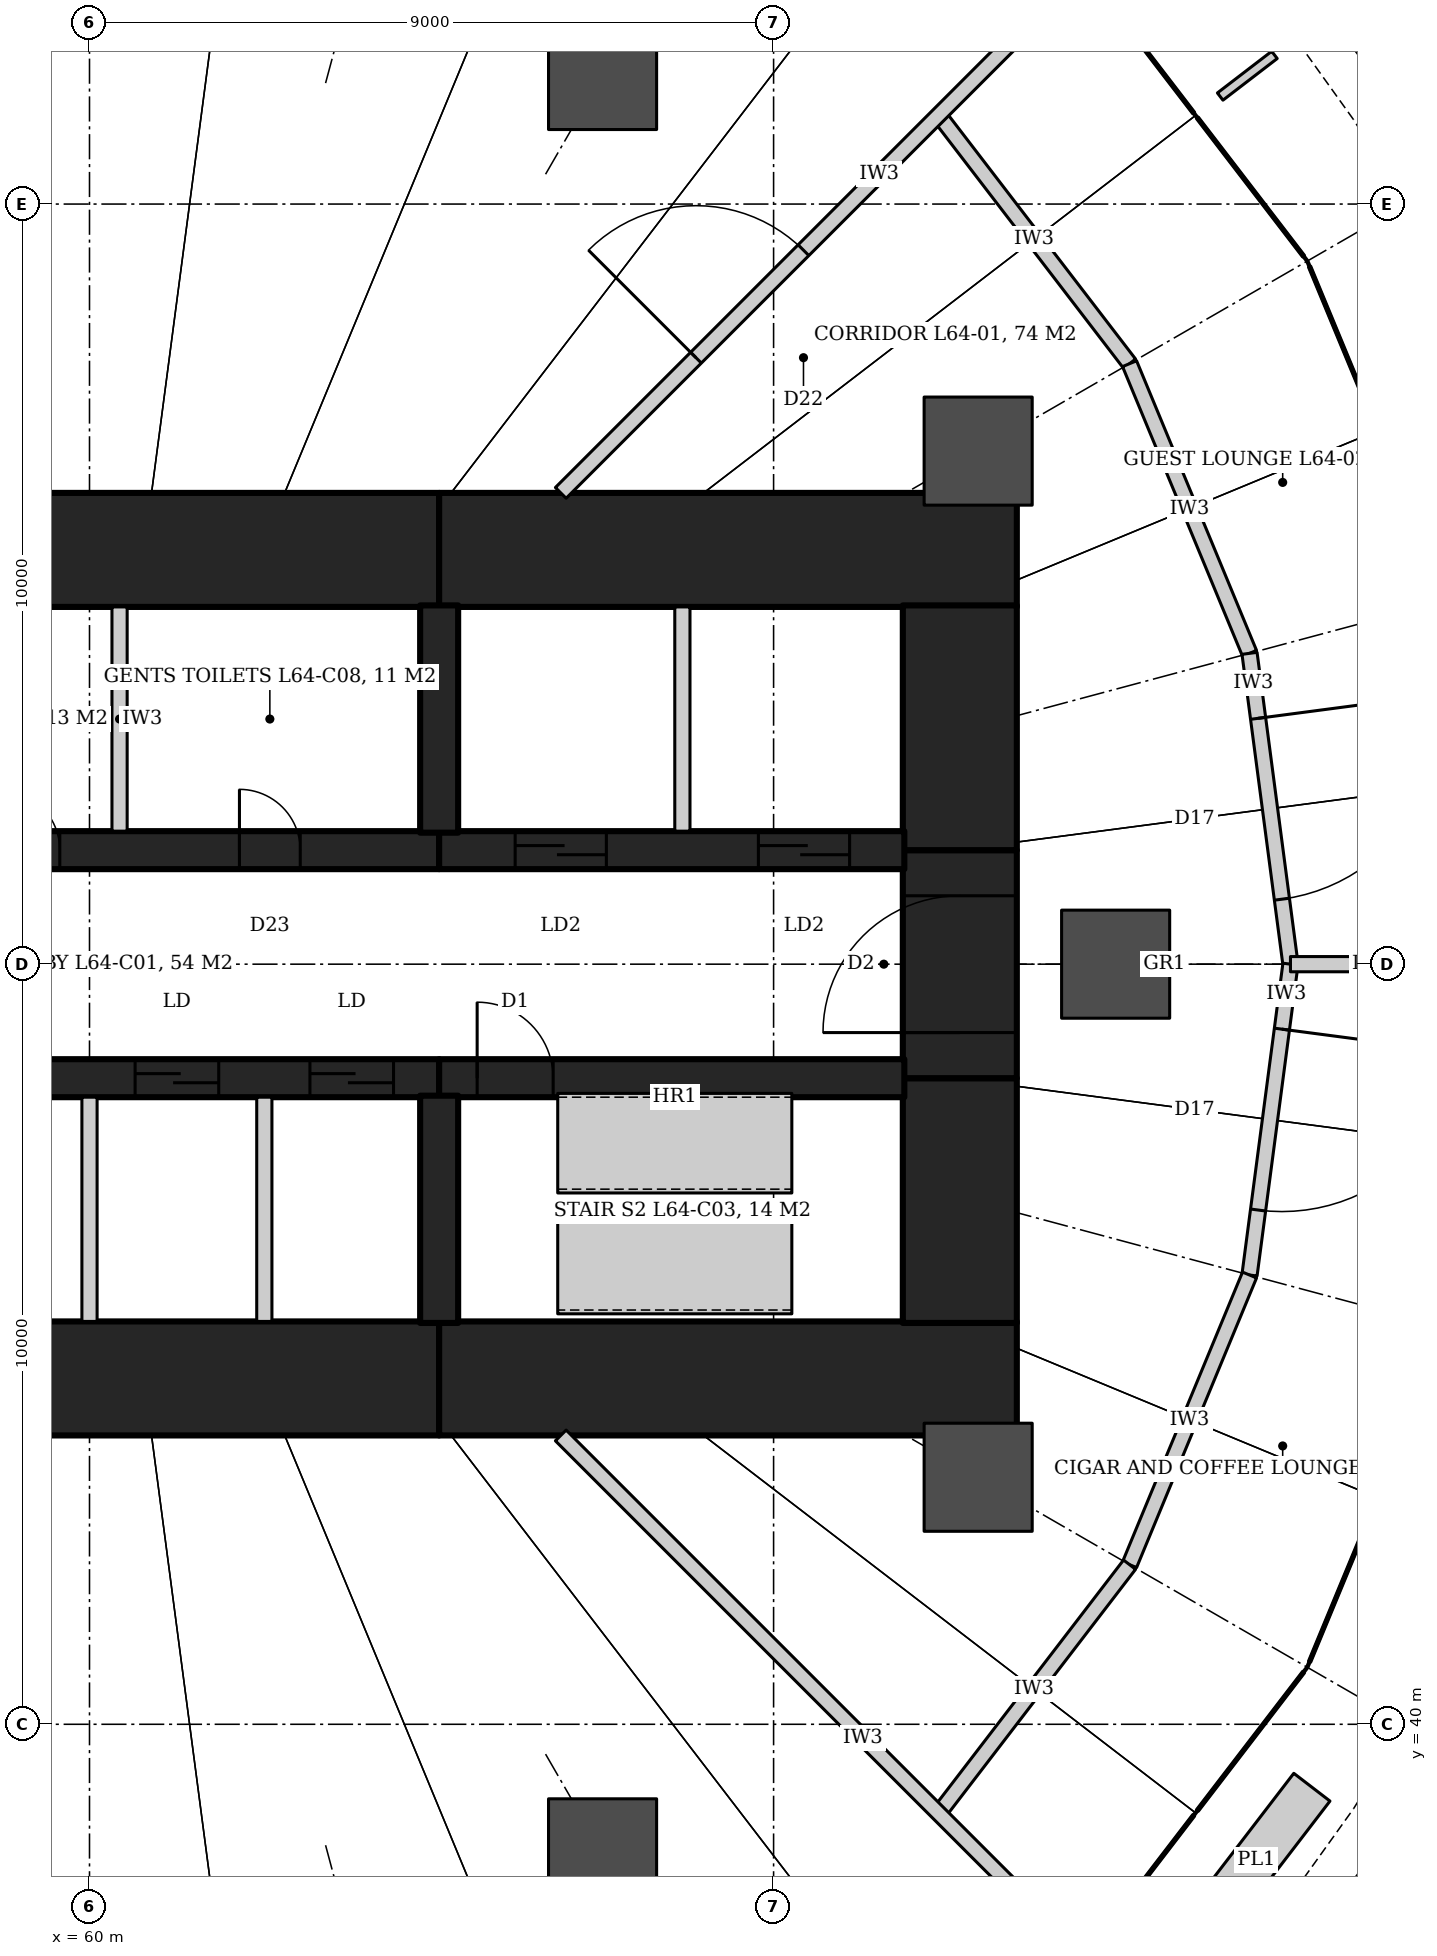
"""IFC4 building model, lengths in metres.
Left out: names, types, materials, properties, quantities, classifications, styles, units other than length and angle.
Written with IfcOpenShell. Run it as: python <this file> out.ifc"""

import sys

from ifc_helpers import new_model, si_unit, direction, frame, frame_2d, origin, origin_2d, place, context, subcontext, project, spatial, rectangle, hollow_circle, extrude, element, fill, save


model = new_model("IFC4")
c1 = context("Model", 3, precision=1e-05, world=origin(), true_north=direction((0.0, 1.0)))
c2 = subcontext(c1, "Body", "Model", "MODEL_VIEW")
j1 = project(units=[si_unit("LENGTHUNIT", "METRE"), si_unit("PLANEANGLEUNIT", "RADIAN")], contexts=[c1])
p1 = place(None, origin())
s1 = spatial("IfcSite", under=j1, at=p1, CompositionType="ELEMENT")
p2 = place(p1, origin())
s2 = spatial("IfcBuilding", under=s1, at=p2, CompositionType="ELEMENT")
p3 = place(p2, frame((0.0, 0.0, 278.0)))
s3 = spatial("IfcBuildingStorey", under=s2, at=p3, CompositionType="ELEMENT", Elevation=278.0)
p4 = place(p3, frame((55.4, 55.45, 0.0), z_axis=(0.0, 0.0, 1.0), x_axis=(1.0, 0.0, 0.0)))
e1 = element("IfcWall", 1, at=p4, inside=s3, PredefinedType="SHEAR", context=c2, shape_type="SweptSolid", body=[
    extrude(rectangle(XDim=9.2, YDim=1.5, at=frame_2d((4.6, 0.0))), origin(), (0.0, 0.0, 1.0), 4.2),
])
p5 = place(p3, frame((64.6, 55.45, 0.0), z_axis=(0.0, 0.0, 1.0), x_axis=(1.0, 0.0, 0.0)))
e2 = element("IfcWall", 2, at=p5, inside=s3, PredefinedType="SHEAR", context=c2, shape_type="SweptSolid", body=[
    extrude(rectangle(XDim=7.6, YDim=1.5, at=frame_2d((3.8, 0.0))), origin(), (0.0, 0.0, 1.0), 4.2),
])
p6 = place(p3, frame((55.4, 44.55, 0.0), z_axis=(0.0, 0.0, 1.0), x_axis=(1.0, 0.0, 0.0)))
e3 = element("IfcWall", 3, at=p6, inside=s3, PredefinedType="SHEAR", context=c2, shape_type="SweptSolid", body=[
    extrude(rectangle(XDim=9.2, YDim=1.5, at=frame_2d((4.6, 0.0))), origin(), (0.0, 0.0, 1.0), 4.2),
])
p7 = place(p3, frame((64.6, 44.55, 0.0), z_axis=(0.0, 0.0, 1.0), x_axis=(1.0, 0.0, 0.0)))
e4 = element("IfcWall", 4, at=p7, inside=s3, PredefinedType="SHEAR", context=c2, shape_type="SweptSolid", body=[
    extrude(rectangle(XDim=7.6, YDim=1.5, at=frame_2d((3.8, 0.0))), origin(), (0.0, 0.0, 1.0), 4.2),
])
p8 = place(p3, frame((71.45, 45.28, 0.0), z_axis=(0.0, 0.0, 1.0), x_axis=(0.0, 1.0, 0.0)))
e5 = element("IfcWall", 5, at=p8, inside=s3, PredefinedType="SHEAR", context=c2, shape_type="SweptSolid", body=[
    extrude(rectangle(XDim=3.22, YDim=1.5, at=frame_2d((1.61, 0.0))), origin(), (0.0, 0.0, 1.0), 4.2),
])
p9 = place(p3, frame((71.45, 48.5, 0.0), z_axis=(0.0, 0.0, 1.0), x_axis=(0.0, 1.0, 0.0)))
e6 = element("IfcWall", 6, at=p9, inside=s3, PredefinedType="SHEAR", context=c2, shape_type="SweptSolid", body=[
    extrude(rectangle(XDim=3.0, YDim=1.5, at=frame_2d((1.5, 0.0))), origin(), (0.0, 0.0, 1.0), 4.2),
])
p10 = place(p9, frame((0.6, 0.0, 0.0)))
e7 = element("IfcOpeningElement", 7, at=p10, cuts=e6, PredefinedType="OPENING", context=c2, shape_type="SweptSolid", body=[
    extrude(rectangle(XDim=1.8, YDim=2.1, at=frame_2d((0.9, 1.05))), frame((0.0, 0.76, 0.0), z_axis=(0.0, -1.0, 0.0), x_axis=(1.0, 0.0, 0.0)), (0.0, 0.0, 1.0), 1.52),
])
p11 = place(p3, frame((71.45, 51.5, 0.0), z_axis=(0.0, 0.0, 1.0), x_axis=(0.0, 1.0, 0.0)))
e8 = element("IfcWall", 8, at=p11, inside=s3, PredefinedType="SHEAR", context=c2, shape_type="SweptSolid", body=[
    extrude(rectangle(XDim=3.22, YDim=1.5, at=frame_2d((1.61, 0.0))), origin(), (0.0, 0.0, 1.0), 4.2),
])
p12 = place(p3, frame((55.4, 51.5, 0.0), z_axis=(0.0, 0.0, 1.0), x_axis=(1.0, 0.0, 0.0)))
e9 = element("IfcWall", 9, at=p12, inside=s3, PredefinedType="SHEAR", context=c2, shape_type="SweptSolid", body=[
    extrude(rectangle(XDim=9.2, YDim=0.5, at=frame_2d((4.6, 0.0))), origin(), (0.0, 0.0, 1.0), 4.2),
])
p13 = place(p12, frame((1.036, 0.0, 0.0)))
e10 = element("IfcOpeningElement", 10, at=p13, cuts=e9, PredefinedType="OPENING", context=c2, shape_type="SweptSolid", body=[
    extrude(rectangle(XDim=0.8, YDim=2.1, at=frame_2d((0.4, 1.05))), frame((0.0, 0.26, 0.0), z_axis=(0.0, -1.0, 0.0), x_axis=(1.0, 0.0, 0.0)), (0.0, 0.0, 1.0), 0.52),
])
p14 = place(p12, frame((3.409, 0.0, 0.0)))
e11 = element("IfcOpeningElement", 11, at=p14, cuts=e9, PredefinedType="OPENING", context=c2, shape_type="SweptSolid", body=[
    extrude(rectangle(XDim=0.8, YDim=2.1, at=frame_2d((0.4, 1.05))), frame((0.0, 0.26, 0.0), z_axis=(0.0, -1.0, 0.0), x_axis=(1.0, 0.0, 0.0)), (0.0, 0.0, 1.0), 0.52),
])
p15 = place(p12, frame((6.573, 0.0, 0.0)))
e12 = element("IfcOpeningElement", 12, at=p15, cuts=e9, PredefinedType="OPENING", context=c2, shape_type="SweptSolid", body=[
    extrude(rectangle(XDim=0.8, YDim=2.1, at=frame_2d((0.4, 1.05))), frame((0.0, 0.26, 0.0), z_axis=(0.0, -1.0, 0.0), x_axis=(1.0, 0.0, 0.0)), (0.0, 0.0, 1.0), 0.52),
])
p16 = place(p3, frame((64.6, 51.5, 0.0), z_axis=(0.0, 0.0, 1.0), x_axis=(1.0, 0.0, 0.0)))
e13 = element("IfcWall", 13, at=p16, inside=s3, PredefinedType="SHEAR", context=c2, shape_type="SweptSolid", body=[
    extrude(rectangle(XDim=6.12, YDim=0.5, at=frame_2d((3.06, 0.0))), origin(), (0.0, 0.0, 1.0), 4.2),
])
p17 = place(p16, frame((1.0, 0.0, 0.0)))
e14 = element("IfcOpeningElement", 14, at=p17, cuts=e13, PredefinedType="OPENING", context=c2, shape_type="SweptSolid", body=[
    extrude(rectangle(XDim=1.2, YDim=2.1, at=frame_2d((0.6, 1.05))), frame((0.0, 0.26, 0.0), z_axis=(0.0, -1.0, 0.0), x_axis=(1.0, 0.0, 0.0)), (0.0, 0.0, 1.0), 0.52),
])
p18 = place(p16, frame((4.2, 0.0, 0.0)))
e15 = element("IfcOpeningElement", 15, at=p18, cuts=e13, PredefinedType="OPENING", context=c2, shape_type="SweptSolid", body=[
    extrude(rectangle(XDim=1.2, YDim=2.1, at=frame_2d((0.6, 1.05))), frame((0.0, 0.26, 0.0), z_axis=(0.0, -1.0, 0.0), x_axis=(1.0, 0.0, 0.0)), (0.0, 0.0, 1.0), 0.52),
])
p19 = place(p3, frame((55.4, 48.5, 0.0), z_axis=(0.0, 0.0, 1.0), x_axis=(1.0, 0.0, 0.0)))
e16 = element("IfcWall", 16, at=p19, inside=s3, PredefinedType="SHEAR", context=c2, shape_type="SweptSolid", body=[
    extrude(rectangle(XDim=9.2, YDim=0.5, at=frame_2d((4.6, 0.0))), origin(), (0.0, 0.0, 1.0), 4.2),
])
p20 = place(p19, frame((0.6, 0.0, 0.0)))
e17 = element("IfcOpeningElement", 17, at=p20, cuts=e16, PredefinedType="OPENING", context=c2, shape_type="SweptSolid", body=[
    extrude(rectangle(XDim=1.1, YDim=2.1, at=frame_2d((0.55, 1.05))), frame((0.0, 0.26, 0.0), z_axis=(0.0, -1.0, 0.0), x_axis=(1.0, 0.0, 0.0)), (0.0, 0.0, 1.0), 0.52),
])
p21 = place(p19, frame((2.9, 0.0, 0.0)))
e18 = element("IfcOpeningElement", 18, at=p21, cuts=e16, PredefinedType="OPENING", context=c2, shape_type="SweptSolid", body=[
    extrude(rectangle(XDim=1.1, YDim=2.1, at=frame_2d((0.55, 1.05))), frame((0.0, 0.26, 0.0), z_axis=(0.0, -1.0, 0.0), x_axis=(1.0, 0.0, 0.0)), (0.0, 0.0, 1.0), 0.52),
])
p22 = place(p19, frame((5.2, 0.0, 0.0)))
e19 = element("IfcOpeningElement", 19, at=p22, cuts=e16, PredefinedType="OPENING", context=c2, shape_type="SweptSolid", body=[
    extrude(rectangle(XDim=1.1, YDim=2.1, at=frame_2d((0.55, 1.05))), frame((0.0, 0.26, 0.0), z_axis=(0.0, -1.0, 0.0), x_axis=(1.0, 0.0, 0.0)), (0.0, 0.0, 1.0), 0.52),
])
p23 = place(p19, frame((7.5, 0.0, 0.0)))
e20 = element("IfcOpeningElement", 20, at=p23, cuts=e16, PredefinedType="OPENING", context=c2, shape_type="SweptSolid", body=[
    extrude(rectangle(XDim=1.1, YDim=2.1, at=frame_2d((0.55, 1.05))), frame((0.0, 0.26, 0.0), z_axis=(0.0, -1.0, 0.0), x_axis=(1.0, 0.0, 0.0)), (0.0, 0.0, 1.0), 0.52),
])
p24 = place(p3, frame((64.6, 48.5, 0.0), z_axis=(0.0, 0.0, 1.0), x_axis=(1.0, 0.0, 0.0)))
e21 = element("IfcWall", 21, at=p24, inside=s3, PredefinedType="SHEAR", context=c2, shape_type="SweptSolid", body=[
    extrude(rectangle(XDim=6.12, YDim=0.5, at=frame_2d((3.06, 0.0))), origin(), (0.0, 0.0, 1.0), 4.2),
])
p25 = place(p24, frame((0.5, 0.0, 0.0)))
e22 = element("IfcOpeningElement", 22, at=p25, cuts=e21, PredefinedType="OPENING", context=c2, shape_type="SweptSolid", body=[
    extrude(rectangle(XDim=1.0, YDim=2.1, at=frame_2d((0.5, 1.05))), frame((0.0, 0.26, 0.0), z_axis=(0.0, -1.0, 0.0), x_axis=(1.0, 0.0, 0.0)), (0.0, 0.0, 1.0), 0.52),
])
for number, where, z_axis, x_axis in (
    (23, (64.6, 51.73, 0.0), (0.0, 0.0, 1.0), (0.0, 1.0, 0.0)),
    (24, (64.6, 48.27, 0.0), (0.0, 0.0, 1.0), (0.0, -1.0, 0.0)),
):
    element("IfcWall", number, at=place(p3, frame(where, z_axis=z_axis, x_axis=x_axis)), inside=s3, PredefinedType="SHEAR", context=c2, shape_type="SweptSolid", body=[
        extrude(rectangle(XDim=2.99, YDim=0.5, at=frame_2d((1.495, 0.0))), origin(), (0.0, 0.0, 1.0), 4.2),
    ])
for number, where, z_axis, x_axis in (
    (25, (73.5, 50.0, 0.0), (0.0, 0.0, 1.0), (1.0, 0.0, 0.0)),
    (26, (71.691, 56.75, 0.0), (0.0, 0.0, 1.0), (1.0, 0.0, 0.0)),
    (27, (66.75, 61.691, 0.0), (0.0, 0.0, 1.0), (1.0, 0.0, 0.0)),
    (28, (66.75, 38.309, 0.0), (0.0, 0.0, 1.0), (1.0, 0.0, 0.0)),
    (29, (71.691, 43.25, 0.0), (0.0, 0.0, 1.0), (1.0, 0.0, 0.0)),
):
    element("IfcColumn", number, at=place(p3, frame(where, z_axis=z_axis, x_axis=x_axis)), inside=s3, PredefinedType="COLUMN", context=c2, shape_type="SweptSolid", body=[
        extrude(hollow_circle(Radius=0.711, WallThickness=0.07, at=origin_2d()), origin(), (0.0, 0.0, 1.0), 4.2),
    ])
p26 = place(p3, frame((71.172, 61.172, 0.0), z_axis=(0.0, 0.0, 1.0), x_axis=(0.608714823874, -0.793389099494, 0.0)))
e30 = element("IfcWall", 30, at=p26, inside=s3, PredefinedType="PARTITIONING", context=c2, shape_type="SweptSolid", body=[
    extrude(rectangle(XDim=4.125, YDim=0.2, at=frame_2d((2.062, 0.0))), origin(), (0.0, 0.0, 1.0), 3.02),
])
p27 = place(p3, frame((73.683, 57.9, 0.0), z_axis=(0.0, 0.0, 1.0), x_axis=(0.382731667114, -0.923859551549, 0.0)))
e31 = element("IfcWall", 31, at=p27, inside=s3, PredefinedType="PARTITIONING", context=c2, shape_type="SweptSolid", body=[
    extrude(rectangle(XDim=4.125, YDim=0.2, at=frame_2d((2.062, 0.0))), origin(), (0.0, 0.0, 1.0), 3.02),
])
p28 = place(p3, frame((75.262, 54.089, 0.0), z_axis=(0.0, 0.0, 1.0), x_axis=(0.130515758099, -0.991446234996, 0.0)))
e32 = element("IfcWall", 32, at=p28, inside=s3, PredefinedType="PARTITIONING", context=c2, shape_type="SweptSolid", body=[
    extrude(rectangle(XDim=4.125, YDim=0.2, at=frame_2d((2.062, 0.0))), origin(), (0.0, 0.0, 1.0), 3.02),
])
p29 = place(p28, frame((0.862, 0.0, 0.0)))
e33 = element("IfcOpeningElement", 33, at=p29, cuts=e32, PredefinedType="OPENING", context=c2, shape_type="SweptSolid", body=[
    extrude(rectangle(XDim=2.4, YDim=2.4, at=frame_2d((1.2, 1.2))), frame((0.0, 0.11, 0.0), z_axis=(0.0, -1.0, 0.0), x_axis=(1.0, 0.0, 0.0)), (0.0, 0.0, 1.0), 0.22),
])
p30 = place(p3, frame((75.8, 50.0, 0.0), z_axis=(0.0, 0.0, 1.0), x_axis=(-0.130515758099, -0.991446234996, 0.0)))
e34 = element("IfcWall", 34, at=p30, inside=s3, PredefinedType="PARTITIONING", context=c2, shape_type="SweptSolid", body=[
    extrude(rectangle(XDim=4.125, YDim=0.2, at=frame_2d((2.062, 0.0))), origin(), (0.0, 0.0, 1.0), 3.02),
])
p31 = place(p30, frame((0.862, 0.0, 0.0)))
e35 = element("IfcOpeningElement", 35, at=p31, cuts=e34, PredefinedType="OPENING", context=c2, shape_type="SweptSolid", body=[
    extrude(rectangle(XDim=2.4, YDim=2.4, at=frame_2d((1.2, 1.2))), frame((0.0, 0.11, 0.0), z_axis=(0.0, -1.0, 0.0), x_axis=(1.0, 0.0, 0.0)), (0.0, 0.0, 1.0), 0.22),
])
p32 = place(p3, frame((75.262, 45.911, 0.0), z_axis=(0.0, 0.0, 1.0), x_axis=(-0.382731667114, -0.923859551549, 0.0)))
e36 = element("IfcWall", 36, at=p32, inside=s3, PredefinedType="PARTITIONING", context=c2, shape_type="SweptSolid", body=[
    extrude(rectangle(XDim=4.125, YDim=0.2, at=frame_2d((2.062, 0.0))), origin(), (0.0, 0.0, 1.0), 3.02),
])
p33 = place(p3, frame((73.683, 42.1, 0.0), z_axis=(0.0, 0.0, 1.0), x_axis=(-0.608714823874, -0.793389099494, 0.0)))
e37 = element("IfcWall", 37, at=p33, inside=s3, PredefinedType="PARTITIONING", context=c2, shape_type="SweptSolid", body=[
    extrude(rectangle(XDim=4.125, YDim=0.2, at=frame_2d((2.062, 0.0))), origin(), (0.0, 0.0, 1.0), 3.02),
])
p34 = place(p3, frame((75.8, 50.0, 0.0), z_axis=(0.0, 0.0, 1.0), x_axis=(1.0, 0.0, 0.0)))
e38 = element("IfcWall", 38, at=p34, inside=s3, PredefinedType="PARTITIONING", context=c2, shape_type="SweptSolid", body=[
    extrude(rectangle(XDim=2.56, YDim=0.2, at=frame_2d((1.28, 0.0))), origin(), (0.0, 0.0, 1.0), 3.02),
])
p35 = place(p3, frame((66.2, 56.2, 0.0), z_axis=(0.0, 0.0, 1.0), x_axis=(0.707106781187, 0.707106781187, 0.0)))
e39 = element("IfcWall", 39, at=p35, inside=s3, PredefinedType="PARTITIONING", context=c2, shape_type="SweptSolid", body=[
    extrude(rectangle(XDim=9.692, YDim=0.2, at=frame_2d((4.846, 0.0))), origin(), (0.0, 0.0, 1.0), 3.02),
])
p36 = place(p35, frame((2.516, 0.0, 0.0)))
e40 = element("IfcOpeningElement", 40, at=p36, cuts=e39, PredefinedType="OPENING", context=c2, shape_type="SweptSolid", body=[
    extrude(rectangle(XDim=2.0, YDim=2.7, at=frame_2d((1.0, 1.35))), frame((0.0, 0.11, 0.0), z_axis=(0.0, -1.0, 0.0), x_axis=(1.0, 0.0, 0.0)), (0.0, 0.0, 1.0), 0.22),
])
p37 = place(p3, frame((66.2, 43.8, 0.0), z_axis=(0.0, 0.0, 1.0), x_axis=(0.707106781187, -0.707106781187, 0.0)))
e41 = element("IfcWall", 41, at=p37, inside=s3, PredefinedType="PARTITIONING", context=c2, shape_type="SweptSolid", body=[
    extrude(rectangle(XDim=9.692, YDim=0.2, at=frame_2d((4.846, 0.0))), origin(), (0.0, 0.0, 1.0), 3.02),
])
for number, where, z_axis, x_axis in (
    (42, (60.0, 45.3, 0.0), (0.0, 0.0, 1.0), (0.0, 1.0, 0.0)),
    (43, (62.3, 45.3, 0.0), (0.0, 0.0, 1.0), (0.0, 1.0, 0.0)),
    (44, (67.8, 51.75, 0.0), (0.0, 0.0, 1.0), (0.0, 1.0, 0.0)),
):
    element("IfcWall", number, at=place(p3, frame(where, z_axis=z_axis, x_axis=x_axis)), inside=s3, PredefinedType="PARTITIONING", context=c2, shape_type="SweptSolid", body=[
        extrude(rectangle(XDim=2.95, YDim=0.2, at=frame_2d((1.475, 0.0))), origin(), (0.0, 0.0, 1.0), 4.2),
    ])
p38 = place(p3, frame((60.396, 51.75, 0.0), z_axis=(0.0, 0.0, 1.0), x_axis=(0.0, 1.0, 0.0)))
e45 = element("IfcWall", 45, at=p38, inside=s3, PredefinedType="PARTITIONING", context=c2, shape_type="SweptSolid", body=[
    extrude(rectangle(XDim=2.95, YDim=0.2, at=frame_2d((1.475, 0.0))), origin(), (0.0, 0.0, 1.0), 4.04),
])
p39 = place(p29, origin())
e46 = element("IfcDoor", 46, at=p39, inside=s3, OperationType="DOUBLE_DOOR_DOUBLE_SWING", PredefinedType="DOOR", context=c2, shape_type="SweptSolid", body=[
    extrude(rectangle(XDim=2.4, YDim=2.4, at=frame_2d((1.2, 1.2))), frame((0.0, 0.025, 0.0), z_axis=(0.0, -1.0, 0.0), x_axis=(1.0, 0.0, 0.0)), (0.0, 0.0, 1.0), 0.05),
])
fill(e33, e46)
p40 = place(p36, origin())
e47 = element("IfcDoor", 47, at=p40, inside=s3, OperationType="DOUBLE_DOOR_DOUBLE_SWING", PredefinedType="DOOR", context=c2, shape_type="SweptSolid", body=[
    extrude(rectangle(XDim=2.0, YDim=2.7, at=frame_2d((1.0, 1.35))), frame((0.0, 0.025, 0.0), z_axis=(0.0, -1.0, 0.0), x_axis=(1.0, 0.0, 0.0)), (0.0, 0.0, 1.0), 0.05),
])
fill(e40, e47)
p41 = place(p31, origin())
e48 = element("IfcDoor", 48, at=p41, inside=s3, OperationType="DOUBLE_DOOR_DOUBLE_SWING", PredefinedType="DOOR", context=c2, shape_type="SweptSolid", body=[
    extrude(rectangle(XDim=2.4, YDim=2.4, at=frame_2d((1.2, 1.2))), frame((0.0, 0.025, 0.0), z_axis=(0.0, -1.0, 0.0), x_axis=(1.0, 0.0, 0.0)), (0.0, 0.0, 1.0), 0.05),
])
fill(e35, e48)
p42 = place(p25, origin())
e49 = element("IfcDoor", 49, at=p42, inside=s3, OperationType="SINGLE_SWING_LEFT", PredefinedType="DOOR", context=c2, shape_type="SweptSolid", body=[
    extrude(rectangle(XDim=1.0, YDim=2.1, at=frame_2d((0.5, 1.05))), frame((0.0, 0.025, 0.0), z_axis=(0.0, -1.0, 0.0), x_axis=(1.0, 0.0, 0.0)), (0.0, 0.0, 1.0), 0.05),
])
fill(e22, e49)
p43 = place(p17, origin())
e50 = element("IfcDoor", 50, at=p43, inside=s3, OperationType="SLIDING_TO_LEFT", PredefinedType="DOOR", context=c2, shape_type="SweptSolid", body=[
    extrude(rectangle(XDim=1.2, YDim=2.1, at=frame_2d((0.6, 1.05))), frame((0.0, 0.025, 0.0), z_axis=(0.0, -1.0, 0.0), x_axis=(1.0, 0.0, 0.0)), (0.0, 0.0, 1.0), 0.05),
])
fill(e14, e50)
p44 = place(p18, origin())
e51 = element("IfcDoor", 51, at=p44, inside=s3, OperationType="SLIDING_TO_LEFT", PredefinedType="DOOR", context=c2, shape_type="SweptSolid", body=[
    extrude(rectangle(XDim=1.2, YDim=2.1, at=frame_2d((0.6, 1.05))), frame((0.0, 0.025, 0.0), z_axis=(0.0, -1.0, 0.0), x_axis=(1.0, 0.0, 0.0)), (0.0, 0.0, 1.0), 0.05),
])
fill(e15, e51)
p45 = place(p22, origin())
e52 = element("IfcDoor", 52, at=p45, inside=s3, OperationType="SLIDING_TO_LEFT", PredefinedType="DOOR", context=c2, shape_type="SweptSolid", body=[
    extrude(rectangle(XDim=1.1, YDim=2.1, at=frame_2d((0.55, 1.05))), frame((0.0, 0.025, 0.0), z_axis=(0.0, -1.0, 0.0), x_axis=(1.0, 0.0, 0.0)), (0.0, 0.0, 1.0), 0.05),
])
fill(e19, e52)
p46 = place(p23, origin())
e53 = element("IfcDoor", 53, at=p46, inside=s3, OperationType="SLIDING_TO_LEFT", PredefinedType="DOOR", context=c2, shape_type="SweptSolid", body=[
    extrude(rectangle(XDim=1.1, YDim=2.1, at=frame_2d((0.55, 1.05))), frame((0.0, 0.025, 0.0), z_axis=(0.0, -1.0, 0.0), x_axis=(1.0, 0.0, 0.0)), (0.0, 0.0, 1.0), 0.05),
])
fill(e20, e53)
p47 = place(p10, origin())
e54 = element("IfcDoor", 54, at=p47, inside=s3, OperationType="DOUBLE_DOOR_DOUBLE_SWING", PredefinedType="DOOR", context=c2, shape_type="SweptSolid", body=[
    extrude(rectangle(XDim=1.8, YDim=2.1, at=frame_2d((0.9, 1.05))), frame((0.0, 0.025, 0.0), z_axis=(0.0, -1.0, 0.0), x_axis=(1.0, 0.0, 0.0)), (0.0, 0.0, 1.0), 0.05),
])
fill(e7, e54)
p48 = place(p14, origin())
e55 = element("IfcDoor", 55, at=p48, inside=s3, OperationType="SINGLE_SWING_LEFT", PredefinedType="DOOR", context=c2, shape_type="SweptSolid", body=[
    extrude(rectangle(XDim=0.8, YDim=2.1, at=frame_2d((0.4, 1.05))), frame((0.0, 0.025, 0.0), z_axis=(0.0, -1.0, 0.0), x_axis=(1.0, 0.0, 0.0)), (0.0, 0.0, 1.0), 0.05),
])
fill(e11, e55)
p49 = place(p15, origin())
e56 = element("IfcDoor", 56, at=p49, inside=s3, OperationType="SINGLE_SWING_LEFT", PredefinedType="DOOR", context=c2, shape_type="SweptSolid", body=[
    extrude(rectangle(XDim=0.8, YDim=2.1, at=frame_2d((0.4, 1.05))), frame((0.0, 0.025, 0.0), z_axis=(0.0, -1.0, 0.0), x_axis=(1.0, 0.0, 0.0)), (0.0, 0.0, 1.0), 0.05),
])
fill(e12, e56)
save(model, sys.argv[1])
